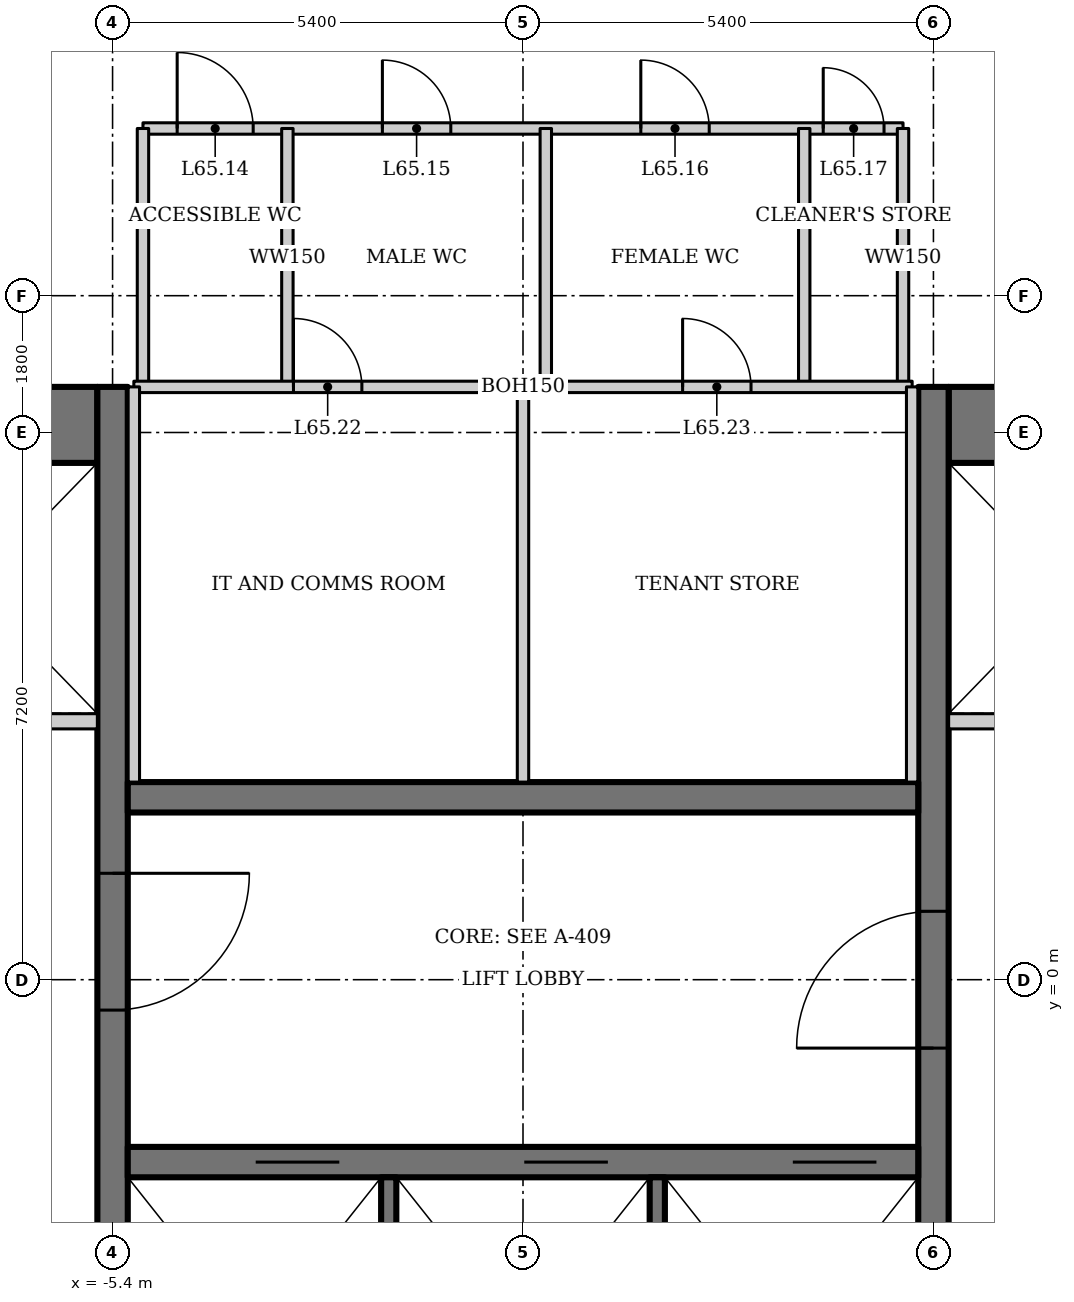
"""IFC4 building model, lengths in metres.
Left out: names, types, materials, properties, quantities, classifications, styles, units other than length and angle.
Written with IfcOpenShell. Run it as: python <this file> out.ifc"""

import sys

from ifc_helpers import new_model, si_unit, direction, frame, frame_2d, origin, place, context, subcontext, project, spatial, rectangle, extrude, element, fill, save


model = new_model("IFC4")
c1 = context("Model", 3, precision=1e-05, world=origin(), true_north=direction((0.0, 1.0)))
c2 = subcontext(c1, "Body", "Model", "MODEL_VIEW")
j1 = project(units=[si_unit("LENGTHUNIT", "METRE"), si_unit("PLANEANGLEUNIT", "RADIAN")], contexts=[c1])
p1 = place(None, origin())
s1 = spatial("IfcSite", under=j1, at=p1, CompositionType="ELEMENT")
p2 = place(p1, origin())
s2 = spatial("IfcBuilding", under=s1, at=p2, CompositionType="ELEMENT")
p3 = place(p2, frame((0.0, 0.0, 279.4)))
s3 = spatial("IfcBuildingStorey", under=s2, at=p3, CompositionType="ELEMENT", Elevation=279.4)
for number, where, z_axis, x_axis in (
    (1, (12.2, 7.3, 0.0), (0.0, 0.0, 1.0), (-1.0, 0.0, 0.0)),
    (2, (-5.6, 7.3, 0.0), (0.0, 0.0, 1.0), (-1.0, 0.0, 0.0)),
):
    element("IfcWall", number, at=place(p3, frame(where, z_axis=z_axis, x_axis=x_axis)), inside=s3, PredefinedType="SHEAR", context=c2, shape_type="SweptSolid", body=[
        extrude(rectangle(XDim=6.6, YDim=1.0, at=frame_2d((3.3, 0.0))), origin(), (0.0, 0.0, 1.0), 5.0),
    ])
p4 = place(p3, frame((5.4, -6.8, 0.0), z_axis=(0.0, 0.0, 1.0), x_axis=(0.0, 1.0, 0.0)))
e3 = element("IfcWall", 3, at=p4, inside=s3, PredefinedType="SHEAR", context=c2, shape_type="SweptSolid", body=[
    extrude(rectangle(XDim=14.6, YDim=0.4, at=frame_2d((7.3, 0.0))), origin(), (0.0, 0.0, 1.0), 5.0),
])
p5 = place(p4, frame((5.9, 0.0, 0.0)))
e4 = element("IfcOpeningElement", 4, at=p5, cuts=e3, PredefinedType="OPENING", context=c2, shape_type="SweptSolid", body=[
    extrude(rectangle(XDim=1.8, YDim=2.1, at=frame_2d((0.9, 1.05))), frame((0.0, 0.21, 0.0), z_axis=(0.0, -1.0, 0.0), x_axis=(1.0, 0.0, 0.0)), (0.0, 0.0, 1.0), 0.42),
])
p6 = place(p3, frame((-5.4, 7.8, 0.0), z_axis=(0.0, 0.0, 1.0), x_axis=(0.0, -1.0, 0.0)))
e5 = element("IfcWall", 5, at=p6, inside=s3, PredefinedType="SHEAR", context=c2, shape_type="SweptSolid", body=[
    extrude(rectangle(XDim=14.6, YDim=0.4, at=frame_2d((7.3, 0.0))), origin(), (0.0, 0.0, 1.0), 5.0),
])
p7 = place(p6, frame((6.4, 0.0, 0.0)))
e6 = element("IfcOpeningElement", 6, at=p7, cuts=e5, PredefinedType="OPENING", context=c2, shape_type="SweptSolid", body=[
    extrude(rectangle(XDim=1.8, YDim=2.1, at=frame_2d((0.9, 1.05))), frame((0.0, 0.21, 0.0), z_axis=(0.0, -1.0, 0.0), x_axis=(1.0, 0.0, 0.0)), (0.0, 0.0, 1.0), 0.42),
])
p8 = place(p3, frame((-5.2, -2.4, 0.0), z_axis=(0.0, 0.0, 1.0), x_axis=(1.0, 0.0, 0.0)))
e7 = element("IfcWall", 7, at=p8, inside=s3, PredefinedType="SHEAR", context=c2, shape_type="SweptSolid", body=[
    extrude(rectangle(XDim=10.4, YDim=0.4, at=frame_2d((5.2, 0.0))), origin(), (0.0, 0.0, 1.0), 5.0),
])
p9 = place(p8, frame((1.683, 0.0, 0.0)))
e8 = element("IfcOpeningElement", 8, at=p9, cuts=e7, PredefinedType="OPENING", context=c2, shape_type="SweptSolid", body=[
    extrude(rectangle(XDim=1.1, YDim=2.2, at=frame_2d((0.55, 1.1))), frame((0.0, 0.21, 0.0), z_axis=(0.0, -1.0, 0.0), x_axis=(1.0, 0.0, 0.0)), (0.0, 0.0, 1.0), 0.42),
])
p10 = place(p8, frame((5.217, 0.0, 0.0)))
e9 = element("IfcOpeningElement", 9, at=p10, cuts=e7, PredefinedType="OPENING", context=c2, shape_type="SweptSolid", body=[
    extrude(rectangle(XDim=1.1, YDim=2.2, at=frame_2d((0.55, 1.1))), frame((0.0, 0.21, 0.0), z_axis=(0.0, -1.0, 0.0), x_axis=(1.0, 0.0, 0.0)), (0.0, 0.0, 1.0), 0.42),
])
p11 = place(p8, frame((8.75, 0.0, 0.0)))
e10 = element("IfcOpeningElement", 10, at=p11, cuts=e7, PredefinedType="OPENING", context=c2, shape_type="SweptSolid", body=[
    extrude(rectangle(XDim=1.1, YDim=2.2, at=frame_2d((0.55, 1.1))), frame((0.0, 0.21, 0.0), z_axis=(0.0, -1.0, 0.0), x_axis=(1.0, 0.0, 0.0)), (0.0, 0.0, 1.0), 0.42),
])
for number, where, z_axis, x_axis in (
    (11, (-1.767, -2.6, 0.0), (0.0, 0.0, 1.0), (0.0, -1.0, 0.0)),
    (12, (1.767, -2.6, 0.0), (0.0, 0.0, 1.0), (0.0, -1.0, 0.0)),
):
    element("IfcWall", number, at=place(p3, frame(where, z_axis=z_axis, x_axis=x_axis)), inside=s3, PredefinedType="SOLIDWALL", context=c2, shape_type="SweptSolid", body=[
        extrude(rectangle(XDim=4.2, YDim=0.2, at=frame_2d((2.1, 0.0))), origin(), (0.0, 0.0, 1.0), 5.0),
    ])
p12 = place(p3, frame((5.2, 2.4, 0.0), z_axis=(0.0, 0.0, 1.0), x_axis=(-1.0, 0.0, 0.0)))
e13 = element("IfcWall", 13, at=p12, inside=s3, PredefinedType="SHEAR", context=c2, shape_type="SweptSolid", body=[
    extrude(rectangle(XDim=10.4, YDim=0.4, at=frame_2d((5.2, 0.0))), origin(), (0.0, 0.0, 1.0), 5.0),
])
p13 = place(p3, frame((12.2, 3.4, 0.0), z_axis=(0.0, 0.0, 1.0), x_axis=(-1.0, 0.0, 0.0)))
e14 = element("IfcWall", 14, at=p13, inside=s3, PredefinedType="SOLIDWALL", context=c2, shape_type="SweptSolid", body=[
    extrude(rectangle(XDim=6.6, YDim=0.2, at=frame_2d((3.3, 0.0))), origin(), (0.0, 0.0, 1.0), 5.0),
])
p14 = place(p13, frame((4.45, 0.0, 0.0)))
e15 = element("IfcOpeningElement", 15, at=p14, cuts=e14, PredefinedType="OPENING", context=c2, shape_type="SweptSolid", body=[
    extrude(rectangle(XDim=1.1, YDim=2.2, at=frame_2d((0.55, 1.1))), frame((0.0, 0.11, 0.0), z_axis=(0.0, -1.0, 0.0), x_axis=(1.0, 0.0, 0.0)), (0.0, 0.0, 1.0), 0.22),
])
p15 = place(p13, frame((0.9, 0.0, 0.0)))
e16 = element("IfcOpeningElement", 16, at=p15, cuts=e14, PredefinedType="OPENING", context=c2, shape_type="SweptSolid", body=[
    extrude(rectangle(XDim=1.4, YDim=2.2, at=frame_2d((0.7, 1.1))), frame((0.0, 0.11, 0.0), z_axis=(0.0, -1.0, 0.0), x_axis=(1.0, 0.0, 0.0)), (0.0, 0.0, 1.0), 0.22),
])
p16 = place(p3, frame((-12.2, 3.4, 0.0), z_axis=(0.0, 0.0, 1.0), x_axis=(1.0, 0.0, 0.0)))
e17 = element("IfcWall", 17, at=p16, inside=s3, PredefinedType="SOLIDWALL", context=c2, shape_type="SweptSolid", body=[
    extrude(rectangle(XDim=6.6, YDim=0.2, at=frame_2d((3.3, 0.0))), origin(), (0.0, 0.0, 1.0), 5.0),
])
p17 = place(p16, frame((1.05, 0.0, 0.0)))
e18 = element("IfcOpeningElement", 18, at=p17, cuts=e17, PredefinedType="OPENING", context=c2, shape_type="SweptSolid", body=[
    extrude(rectangle(XDim=1.1, YDim=2.2, at=frame_2d((0.55, 1.1))), frame((0.0, 0.11, 0.0), z_axis=(0.0, -1.0, 0.0), x_axis=(1.0, 0.0, 0.0)), (0.0, 0.0, 1.0), 0.22),
])
p18 = place(p16, frame((4.3, 0.0, 0.0)))
e19 = element("IfcOpeningElement", 19, at=p18, cuts=e17, PredefinedType="OPENING", context=c2, shape_type="SweptSolid", body=[
    extrude(rectangle(XDim=1.4, YDim=2.2, at=frame_2d((0.7, 1.1))), frame((0.0, 0.11, 0.0), z_axis=(0.0, -1.0, 0.0), x_axis=(1.0, 0.0, 0.0)), (0.0, 0.0, 1.0), 0.22),
])
p19 = place(p3, frame((-5.0, 11.2, 0.0), z_axis=(0.0, 0.0, 1.0), x_axis=(1.0, 0.0, 0.0)))
e20 = element("IfcWall", 20, at=p19, inside=s3, PredefinedType="SOLIDWALL", context=c2, shape_type="SweptSolid", body=[
    extrude(rectangle(XDim=10.0, YDim=0.15, at=frame_2d((5.0, 0.0))), origin(), (0.0, 0.0, 1.0), 4.8),
])
p20 = place(p19, frame((0.45, 0.0, 0.0)))
e21 = element("IfcOpeningElement", 21, at=p20, cuts=e20, PredefinedType="OPENING", context=c2, shape_type="SweptSolid", body=[
    extrude(rectangle(XDim=1.0, YDim=2.1, at=frame_2d((0.5, 1.05))), frame((0.0, 0.085, 0.0), z_axis=(0.0, -1.0, 0.0), x_axis=(1.0, 0.0, 0.0)), (0.0, 0.0, 1.0), 0.17),
])
p21 = place(p19, frame((3.15, 0.0, 0.0)))
e22 = element("IfcOpeningElement", 22, at=p21, cuts=e20, PredefinedType="OPENING", context=c2, shape_type="SweptSolid", body=[
    extrude(rectangle(XDim=0.9, YDim=2.1, at=frame_2d((0.45, 1.05))), frame((0.0, 0.085, 0.0), z_axis=(0.0, -1.0, 0.0), x_axis=(1.0, 0.0, 0.0)), (0.0, 0.0, 1.0), 0.17),
])
p22 = place(p19, frame((6.55, 0.0, 0.0)))
e23 = element("IfcOpeningElement", 23, at=p22, cuts=e20, PredefinedType="OPENING", context=c2, shape_type="SweptSolid", body=[
    extrude(rectangle(XDim=0.9, YDim=2.1, at=frame_2d((0.45, 1.05))), frame((0.0, 0.085, 0.0), z_axis=(0.0, -1.0, 0.0), x_axis=(1.0, 0.0, 0.0)), (0.0, 0.0, 1.0), 0.17),
])
p23 = place(p19, frame((8.95, 0.0, 0.0)))
e24 = element("IfcOpeningElement", 24, at=p23, cuts=e20, PredefinedType="OPENING", context=c2, shape_type="SweptSolid", body=[
    extrude(rectangle(XDim=0.8, YDim=2.1, at=frame_2d((0.4, 1.05))), frame((0.0, 0.085, 0.0), z_axis=(0.0, -1.0, 0.0), x_axis=(1.0, 0.0, 0.0)), (0.0, 0.0, 1.0), 0.17),
])
for number, where, z_axis, x_axis in (
    (25, (-5.0, 7.8, 0.0), (0.0, 0.0, 1.0), (0.0, 1.0, 0.0)),
    (26, (5.0, 7.8, 0.0), (0.0, 0.0, 1.0), (0.0, 1.0, 0.0)),
    (27, (-3.1, 7.8, 0.0), (0.0, 0.0, 1.0), (0.0, 1.0, 0.0)),
):
    element("IfcWall", number, at=place(p3, frame(where, z_axis=z_axis, x_axis=x_axis)), inside=s3, PredefinedType="SOLIDWALL", context=c2, shape_type="SweptSolid", body=[
        extrude(rectangle(XDim=3.4, YDim=0.15, at=frame_2d((1.7, 0.0))), origin(), (0.0, 0.0, 1.0), 4.8),
    ])
p24 = place(p3, frame((0.3, 7.8, 0.0), z_axis=(0.0, 0.0, 1.0), x_axis=(0.0, 1.0, 0.0)))
e28 = element("IfcWall", 28, at=p24, inside=s3, PredefinedType="SOLIDWALL", context=c2, shape_type="SweptSolid", body=[
    extrude(rectangle(XDim=3.4, YDim=0.15, at=frame_2d((1.7, 0.0))), origin(), (0.0, 0.0, 1.0), 3.6),
])
p25 = place(p3, frame((3.7, 7.8, 0.0), z_axis=(0.0, 0.0, 1.0), x_axis=(0.0, 1.0, 0.0)))
e29 = element("IfcWall", 29, at=p25, inside=s3, PredefinedType="SOLIDWALL", context=c2, shape_type="SweptSolid", body=[
    extrude(rectangle(XDim=3.4, YDim=0.15, at=frame_2d((1.7, 0.0))), origin(), (0.0, 0.0, 1.0), 4.8),
])
p26 = place(p3, frame((-5.12, 7.8, 0.0), z_axis=(0.0, 0.0, 1.0), x_axis=(1.0, 0.0, 0.0)))
e30 = element("IfcWall", 30, at=p26, inside=s3, PredefinedType="PARTITIONING", context=c2, shape_type="SweptSolid", body=[
    extrude(rectangle(XDim=10.24, YDim=0.15, at=frame_2d((5.12, 0.0))), origin(), (0.0, 0.0, 1.0), 4.8),
])
p27 = place(p26, frame((2.1, 0.0, 0.0)))
e31 = element("IfcOpeningElement", 31, at=p27, cuts=e30, PredefinedType="OPENING", context=c2, shape_type="SweptSolid", body=[
    extrude(rectangle(XDim=0.9, YDim=2.1, at=frame_2d((0.45, 1.05))), frame((0.0, 0.085, 0.0), z_axis=(0.0, -1.0, 0.0), x_axis=(1.0, 0.0, 0.0)), (0.0, 0.0, 1.0), 0.17),
])
p28 = place(p26, frame((7.22, 0.0, 0.0)))
e32 = element("IfcOpeningElement", 32, at=p28, cuts=e30, PredefinedType="OPENING", context=c2, shape_type="SweptSolid", body=[
    extrude(rectangle(XDim=0.9, YDim=2.1, at=frame_2d((0.45, 1.05))), frame((0.0, 0.085, 0.0), z_axis=(0.0, -1.0, 0.0), x_axis=(1.0, 0.0, 0.0)), (0.0, 0.0, 1.0), 0.17),
])
for number, where, z_axis, x_axis in (
    (33, (-5.12, 2.6, 0.0), (0.0, 0.0, 1.0), (0.0, 1.0, 0.0)),
    (34, (5.12, 2.6, 0.0), (0.0, 0.0, 1.0), (0.0, 1.0, 0.0)),
):
    element("IfcWall", number, at=place(p3, frame(where, z_axis=z_axis, x_axis=x_axis)), inside=s3, PredefinedType="PARTITIONING", context=c2, shape_type="SweptSolid", body=[
        extrude(rectangle(XDim=5.2, YDim=0.15, at=frame_2d((2.6, 0.0))), origin(), (0.0, 0.0, 1.0), 4.8),
    ])
p29 = place(p3, frame((0.0, 2.6, 0.0), z_axis=(0.0, 0.0, 1.0), x_axis=(0.0, 1.0, 0.0)))
e35 = element("IfcWall", 35, at=p29, inside=s3, PredefinedType="PARTITIONING", context=c2, shape_type="SweptSolid", body=[
    extrude(rectangle(XDim=5.2, YDim=0.15, at=frame_2d((2.6, 0.0))), origin(), (0.0, 0.0, 1.0), 3.6),
])
p30 = place(p5, origin())
e36 = element("IfcDoor", 36, at=p30, inside=s3, OperationType="DOUBLE_DOOR_DOUBLE_SWING", PredefinedType="DOOR", context=c2, shape_type="SweptSolid", body=[
    extrude(rectangle(XDim=1.8, YDim=2.1, at=frame_2d((0.9, 1.05))), frame((0.0, 0.025, 0.0), z_axis=(0.0, -1.0, 0.0), x_axis=(1.0, 0.0, 0.0)), (0.0, 0.0, 1.0), 0.05),
])
fill(e4, e36)
p31 = place(p7, origin())
e37 = element("IfcDoor", 37, at=p31, inside=s3, OperationType="DOUBLE_DOOR_DOUBLE_SWING", PredefinedType="DOOR", context=c2, shape_type="SweptSolid", body=[
    extrude(rectangle(XDim=1.8, YDim=2.1, at=frame_2d((0.9, 1.05))), frame((0.0, 0.025, 0.0), z_axis=(0.0, -1.0, 0.0), x_axis=(1.0, 0.0, 0.0)), (0.0, 0.0, 1.0), 0.05),
])
fill(e6, e37)
p32 = place(p9, origin())
e38 = element("IfcDoor", 38, at=p32, inside=s3, OperationType="DOUBLE_DOOR_SLIDING", PredefinedType="DOOR", context=c2, shape_type="SweptSolid", body=[
    extrude(rectangle(XDim=1.1, YDim=2.2, at=frame_2d((0.55, 1.1))), frame((0.0, 0.025, 0.0), z_axis=(0.0, -1.0, 0.0), x_axis=(1.0, 0.0, 0.0)), (0.0, 0.0, 1.0), 0.05),
])
fill(e8, e38)
p33 = place(p10, origin())
e39 = element("IfcDoor", 39, at=p33, inside=s3, OperationType="DOUBLE_DOOR_SLIDING", PredefinedType="DOOR", context=c2, shape_type="SweptSolid", body=[
    extrude(rectangle(XDim=1.1, YDim=2.2, at=frame_2d((0.55, 1.1))), frame((0.0, 0.025, 0.0), z_axis=(0.0, -1.0, 0.0), x_axis=(1.0, 0.0, 0.0)), (0.0, 0.0, 1.0), 0.05),
])
fill(e9, e39)
p34 = place(p11, origin())
e40 = element("IfcDoor", 40, at=p34, inside=s3, OperationType="DOUBLE_DOOR_SLIDING", PredefinedType="DOOR", context=c2, shape_type="SweptSolid", body=[
    extrude(rectangle(XDim=1.1, YDim=2.2, at=frame_2d((0.55, 1.1))), frame((0.0, 0.025, 0.0), z_axis=(0.0, -1.0, 0.0), x_axis=(1.0, 0.0, 0.0)), (0.0, 0.0, 1.0), 0.05),
])
fill(e10, e40)
p35 = place(p20, origin())
e41 = element("IfcDoor", 41, at=p35, inside=s3, OperationType="SINGLE_SWING_LEFT", PredefinedType="DOOR", context=c2, shape_type="SweptSolid", body=[
    extrude(rectangle(XDim=1.0, YDim=2.1, at=frame_2d((0.5, 1.05))), frame((0.0, 0.025, 0.0), z_axis=(0.0, -1.0, 0.0), x_axis=(1.0, 0.0, 0.0)), (0.0, 0.0, 1.0), 0.05),
])
fill(e21, e41)
p36 = place(p21, origin())
e42 = element("IfcDoor", 42, at=p36, inside=s3, OperationType="SINGLE_SWING_LEFT", PredefinedType="DOOR", context=c2, shape_type="SweptSolid", body=[
    extrude(rectangle(XDim=0.9, YDim=2.1, at=frame_2d((0.45, 1.05))), frame((0.0, 0.025, 0.0), z_axis=(0.0, -1.0, 0.0), x_axis=(1.0, 0.0, 0.0)), (0.0, 0.0, 1.0), 0.05),
])
fill(e22, e42)
p37 = place(p22, origin())
e43 = element("IfcDoor", 43, at=p37, inside=s3, OperationType="SINGLE_SWING_LEFT", PredefinedType="DOOR", context=c2, shape_type="SweptSolid", body=[
    extrude(rectangle(XDim=0.9, YDim=2.1, at=frame_2d((0.45, 1.05))), frame((0.0, 0.025, 0.0), z_axis=(0.0, -1.0, 0.0), x_axis=(1.0, 0.0, 0.0)), (0.0, 0.0, 1.0), 0.05),
])
fill(e23, e43)
p38 = place(p23, origin())
e44 = element("IfcDoor", 44, at=p38, inside=s3, OperationType="SINGLE_SWING_LEFT", PredefinedType="DOOR", context=c2, shape_type="SweptSolid", body=[
    extrude(rectangle(XDim=0.8, YDim=2.1, at=frame_2d((0.4, 1.05))), frame((0.0, 0.025, 0.0), z_axis=(0.0, -1.0, 0.0), x_axis=(1.0, 0.0, 0.0)), (0.0, 0.0, 1.0), 0.05),
])
fill(e24, e44)
p39 = place(p27, origin())
e45 = element("IfcDoor", 45, at=p39, inside=s3, OperationType="SINGLE_SWING_LEFT", PredefinedType="DOOR", context=c2, shape_type="SweptSolid", body=[
    extrude(rectangle(XDim=0.9, YDim=2.1, at=frame_2d((0.45, 1.05))), frame((0.0, 0.025, 0.0), z_axis=(0.0, -1.0, 0.0), x_axis=(1.0, 0.0, 0.0)), (0.0, 0.0, 1.0), 0.05),
])
fill(e31, e45)
p40 = place(p28, origin())
e46 = element("IfcDoor", 46, at=p40, inside=s3, OperationType="SINGLE_SWING_LEFT", PredefinedType="DOOR", context=c2, shape_type="SweptSolid", body=[
    extrude(rectangle(XDim=0.9, YDim=2.1, at=frame_2d((0.45, 1.05))), frame((0.0, 0.025, 0.0), z_axis=(0.0, -1.0, 0.0), x_axis=(1.0, 0.0, 0.0)), (0.0, 0.0, 1.0), 0.05),
])
fill(e32, e46)
save(model, sys.argv[1])
